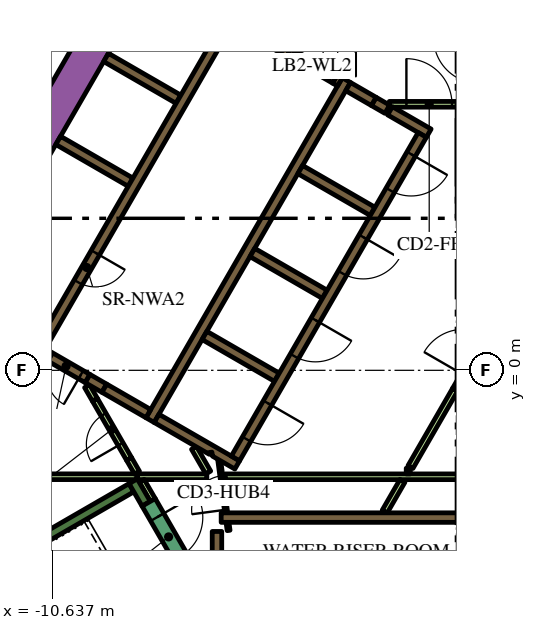
"""IFC4 building model, lengths in metres.
Left out: names, types, materials, properties, quantities, classifications, styles, units other than length and angle.
Written with IfcOpenShell. Run it as: python <this file> out.ifc"""

import sys

from ifc_helpers import new_model, si_unit, direction, frame, frame_2d, origin, place, context, subcontext, project, spatial, polyline, rectangle, outline, extrude, element, fill, save


model = new_model("IFC4")
c1 = context("Model", 3, precision=1e-05, world=origin(), true_north=direction((0.0, 1.0)))
c2 = subcontext(c1, "Body", "Model", "MODEL_VIEW")
j1 = project(units=[si_unit("LENGTHUNIT", "METRE"), si_unit("PLANEANGLEUNIT", "RADIAN")], contexts=[c1])
p1 = place(None, origin())
s1 = spatial("IfcSite", under=j1, at=p1, CompositionType="ELEMENT")
p2 = place(p1, origin())
s2 = spatial("IfcBuilding", under=s1, at=p2, CompositionType="ELEMENT")
p3 = place(p2, frame((0.0, 0.0, 58.8)))
s3 = spatial("IfcBuildingStorey", under=s2, at=p3, CompositionType="ELEMENT", Elevation=58.8)
p4 = place(p3, frame((-14.268, 0.387, 0.0), z_axis=(0.0, 0.0, 1.0), x_axis=(0.499994617707, 0.866028511231, 0.0)))
e1 = element("IfcWall", 1, at=p4, inside=s3, PredefinedType="SOLIDWALL", context=c2, shape_type="SweptSolid", body=[
    extrude(rectangle(XDim=18.817, YDim=0.9, at=frame_2d((9.409, 0.0))), origin(), (0.0, 0.0, 1.0), 3.9),
])
p5 = place(p3, frame((-14.44, -6.49, 0.0), z_axis=(0.0, 0.0, 1.0), x_axis=(0.866022966069, 0.500004222222, 0.0)))
e2 = element("IfcWall", 2, at=p5, inside=s3, PredefinedType="SOLIDWALL", context=c2, shape_type="SweptSolid", body=[
    extrude(rectangle(XDim=6.8, YDim=0.25, at=frame_2d((3.4, 0.0))), origin(), (0.0, 0.0, 1.0), 3.9),
])
p6 = place(p3, frame((-8.163, -3.511, 0.0), z_axis=(0.0, 0.0, 1.0), x_axis=(-0.500206266495, 0.865906283012, 0.0)))
e3 = element("IfcWall", 3, at=p6, inside=s3, PredefinedType="SOLIDWALL", context=c2, shape_type="SweptSolid", body=[
    extrude(rectangle(XDim=0.684, YDim=0.25, at=frame_2d((0.342, 0.0))), origin(), (0.0, 0.0, 1.0), 3.9),
])
p7 = place(p3, frame((-6.3, -4.24, 0.0), z_axis=(0.0, 0.0, 1.0), x_axis=(0.0, -1.0, 0.0)))
e4 = element("IfcWall", 4, at=p7, inside=s3, PredefinedType="SOLIDWALL", context=c2, shape_type="SweptSolid", body=[
    extrude(rectangle(XDim=2.914, YDim=0.25, at=frame_2d((1.457, 0.0))), origin(), (0.0, 0.0, 1.0), 3.9),
])
p8 = place(p3, frame((-6.19, -3.875, 0.0), z_axis=(0.0, 0.0, 1.0), x_axis=(1.0, 0.0, 0.0)))
e5 = element("IfcWall", 5, at=p8, inside=s3, PredefinedType="SOLIDWALL", context=c2, shape_type="SweptSolid", body=[
    extrude(rectangle(XDim=12.615, YDim=0.25, at=frame_2d((6.307, 0.0))), origin(), (0.0, 0.0, 1.0), 3.9),
])
p9 = place(p3, frame((-8.06, -1.311, 0.0), z_axis=(0.0, 0.0, 1.0), x_axis=(0.50000273126, 0.866023826885, 0.0)))
e6 = element("IfcWall", 6, at=p9, inside=s3, PredefinedType="SOLIDWALL", context=c2, shape_type="SweptSolid", body=[
    extrude(rectangle(XDim=10.33, YDim=0.25, at=frame_2d((5.165, 0.0))), origin(), (0.0, 0.0, 1.0), 3.9),
])
p10 = place(p3, frame((-1.819, 6.87, 0.0), z_axis=(0.0, 0.0, 1.0), x_axis=(-0.866294599386, 0.499533449405, 0.0)))
e7 = element("IfcWall", 7, at=p10, inside=s3, PredefinedType="SOLIDWALL", context=c2, shape_type="SweptSolid", body=[
    extrude(rectangle(XDim=0.41, YDim=0.25, at=frame_2d((0.205, 0.0))), origin(), (0.0, 0.0, 1.0), 3.9),
])
p11 = place(p3, frame((-2.849, 7.465, 0.0), z_axis=(0.0, 0.0, 1.0), x_axis=(0.865955664968, -0.500120771724, 0.0)))
e8 = element("IfcWall", 8, at=p11, inside=s3, PredefinedType="SOLIDWALL", context=c2, shape_type="SweptSolid", body=[
    extrude(rectangle(XDim=0.778, YDim=0.25, at=frame_2d((0.389, 0.0))), origin(), (0.0, 0.0, 1.0), 3.9),
])
p12 = place(p3, frame((-0.728, 6.24, 0.0), z_axis=(0.0, 0.0, 1.0), x_axis=(-0.866002680491, 0.500039355833, 0.0)))
e9 = element("IfcWall", 9, at=p12, inside=s3, PredefinedType="SOLIDWALL", context=c2, shape_type="SweptSolid", body=[
    extrude(rectangle(XDim=1.178, YDim=0.25, at=frame_2d((0.589, 0.0))), origin(), (0.0, 0.0, 1.0), 3.9),
])
for number, where, z_axis, x_axis in (
    (10, (-2.204, 4.182, 0.0), (0.0, 0.0, 1.0), (-0.866, 0.5, 0.0)),
    (11, (-5.369, 3.1, 0.0), (0.0, 0.0, 1.0), (0.866, -0.5, 0.0)),
    (12, (-4.724, -0.182, 0.0), (0.0, 0.0, 1.0), (-0.866, 0.5, 0.0)),
):
    element("IfcWall", number, at=place(p3, frame(where, z_axis=z_axis, x_axis=x_axis)), inside=s3, PredefinedType="SOLIDWALL", context=c2, shape_type="SweptSolid", body=[
        extrude(rectangle(XDim=2.2, YDim=0.25, at=frame_2d((1.1, 0.0))), origin(), (0.0, 0.0, 1.0), 3.9),
    ])
p13 = place(p3, origin())
e13 = element("IfcWall", 13, at=p13, inside=s3, PredefinedType="SOLIDWALL", context=c2, shape_type="SweptSolid", body=[
    extrude(outline(polyline([(-5.922, -2.257), (-5.922, -2.257), (-5.705, -2.382), (-5.83, -2.598), (-6.418, -2.258), (-6.433, -2.153), (-6.433, -2.153), (-6.433, -2.153), (-6.508, -2.163), (-6.508, -2.163), (-6.508, -2.163), (-6.501, -2.21), (-7.952, -1.373), (-7.827, -1.156), (-5.922, -2.257)])), origin(), (0.0, 0.0, 1.0), 3.9),
])
p14 = place(p3, frame((-9.708, -0.215, 0.0), z_axis=(0.0, 0.0, 1.0), x_axis=(0.866113839764, -0.499846793097, 0.0)))
e14 = element("IfcWall", 14, at=p14, inside=s3, PredefinedType="SOLIDWALL", context=c2, shape_type="SweptSolid", body=[
    extrude(rectangle(XDim=0.51, YDim=0.25, at=frame_2d((0.255, 0.0))), origin(), (0.0, 0.0, 1.0), 3.9),
])
p15 = place(p3, frame((-9.265, -0.471, 0.0), z_axis=(0.0, 0.0, 1.0), x_axis=(0.865954634268, -0.500122556369, 0.0)))
e15 = element("IfcWall", 15, at=p15, inside=s3, PredefinedType="SOLIDWALL", context=c2, shape_type="SweptSolid", body=[
    extrude(rectangle(XDim=1.338, YDim=0.25, at=frame_2d((0.669, 0.0))), origin(), (0.0, 0.0, 1.0), 3.9),
])
e16 = element("IfcWall", 16, at=p13, inside=s3, PredefinedType="SOLIDWALL", context=c2, shape_type="SweptSolid", body=[
    extrude(outline(polyline([(-3.128, 7.481), (-3.259, 7.557), (-3.134, 7.773), (-3.003, 7.698), (-3.128, 7.481)])), origin(), (0.0, 0.0, 1.0), 3.9),
])
for number, where, z_axis, x_axis in (
    (17, (-8.574, 4.95, 0.0), (0.0, 0.0, 1.0), (-0.866, 0.5, 0.0)),
    (18, (-7.314, 7.132, 0.0), (0.0, 0.0, 1.0), (-0.866, 0.5, 0.0)),
):
    element("IfcWall", number, at=place(p3, frame(where, z_axis=z_axis, x_axis=x_axis)), inside=s3, PredefinedType="SOLIDWALL", context=c2, shape_type="SweptSolid", body=[
        extrude(rectangle(XDim=2.2, YDim=0.25, at=frame_2d((1.1, 0.0))), origin(), (0.0, 0.0, 1.0), 3.9),
    ])
p16 = place(p3, frame((-7.959, 10.415, 0.0), z_axis=(0.0, 0.0, 1.0), x_axis=(0.866020958405, -0.500007699544, 0.0)))
e19 = element("IfcWall", 19, at=p16, inside=s3, PredefinedType="SOLIDWALL", context=c2, shape_type="SweptSolid", body=[
    extrude(rectangle(XDim=4.1, YDim=0.25, at=frame_2d((2.05, 0.0))), origin(), (0.0, 0.0, 1.0), 3.9),
])
p17 = place(p3, frame((-8.395, -2.8, 0.0), z_axis=(0.0, 0.0, 1.0), x_axis=(1.0, 0.0, 0.0)))
e20 = element("IfcWall", 20, at=p17, inside=s3, PredefinedType="PARTITIONING", context=c2, shape_type="SweptSolid", body=[
    extrude(rectangle(XDim=1.828, YDim=0.15, at=frame_2d((0.914, 0.0))), origin(), (0.0, 0.0, 1.0), 2.75),
])
p18 = place(p3, frame((-11.115, -2.8, 0.0), z_axis=(0.0, 0.0, 1.0), x_axis=(1.0, 0.0, 0.0)))
e21 = element("IfcWall", 21, at=p18, inside=s3, PredefinedType="PARTITIONING", context=c2, shape_type="SweptSolid", body=[
    extrude(rectangle(XDim=2.708, YDim=0.15, at=frame_2d((1.354, 0.0))), origin(), (0.0, 0.0, 1.0), 2.75),
])
p19 = place(p3, frame((-6.531, -2.689, 0.0), z_axis=(0.0, 0.0, 1.0), x_axis=(-0.499967446111, 0.866044197965, 0.0)))
e22 = element("IfcWall", 22, at=p19, inside=s3, PredefinedType="PARTITIONING", context=c2, shape_type="SweptSolid", body=[
    extrude(rectangle(XDim=0.748, YDim=0.15, at=frame_2d((0.374, 0.0))), origin(), (0.0, 0.0, 1.0), 2.75),
])
p20 = place(p3, frame((-7.99, -3.412, 0.0), z_axis=(0.0, 0.0, 1.0), x_axis=(-0.500193841991, 0.86591346013, 0.0)))
e23 = element("IfcWall", 23, at=p20, inside=s3, PredefinedType="PARTITIONING", context=c2, shape_type="SweptSolid", body=[
    extrude(rectangle(XDim=0.583, YDim=0.15, at=frame_2d((0.292, 0.0))), origin(), (0.0, 0.0, 1.0), 2.75),
])
p21 = place(p3, frame((-8.612, -2.333, 0.0), z_axis=(0.0, 0.0, 1.0), x_axis=(0.500248216681, -0.86588204838, 0.0)))
e24 = element("IfcWall", 24, at=p21, inside=s3, PredefinedType="PARTITIONING", context=c2, shape_type="SweptSolid", body=[
    extrude(rectangle(XDim=0.415, YDim=0.15, at=frame_2d((0.208, 0.0))), origin(), (0.0, 0.0, 1.0), 2.75),
])
p22 = place(p3, frame((-6.086, -2.801, 0.0), z_axis=(0.0, 0.0, 1.0), x_axis=(1.0, 0.0, 0.0)))
e25 = element("IfcWall", 25, at=p22, inside=s3, PredefinedType="PARTITIONING", context=c2, shape_type="SweptSolid", body=[
    extrude(rectangle(XDim=7.524, YDim=0.15, at=frame_2d((3.762, 0.0))), origin(), (0.0, 0.0, 1.0), 2.75),
])
p23 = place(p3, frame((-1.887, -3.718, 0.0), z_axis=(0.0, 0.0, 1.0), x_axis=(0.499842898591, 0.866116087328, 0.0)))
e26 = element("IfcWall", 26, at=p23, inside=s3, PredefinedType="PARTITIONING", context=c2, shape_type="SweptSolid", body=[
    extrude(rectangle(XDim=0.936, YDim=0.15, at=frame_2d((0.468, 0.0))), origin(), (0.0, 0.0, 1.0), 2.75),
])
p24 = place(p3, frame((-1.212, -2.651, 0.0), z_axis=(0.0, 0.0, 1.0), x_axis=(-1.0, 0.0, 0.0)))
e27 = element("IfcWall", 27, at=p24, inside=s3, PredefinedType="PARTITIONING", context=c2, shape_type="SweptSolid", body=[
    extrude(rectangle(XDim=0.108, YDim=0.15, at=frame_2d((0.054, 0.0))), origin(), (0.0, 0.0, 1.0), 2.75),
])
p25 = place(p3, frame((-1.208, -2.544, 0.0), z_axis=(0.0, 0.0, 1.0), x_axis=(0.499995339376, 0.86602809458, 0.0)))
e28 = element("IfcWall", 28, at=p25, inside=s3, PredefinedType="PARTITIONING", context=c2, shape_type="SweptSolid", body=[
    extrude(rectangle(XDim=2.349, YDim=0.15, at=frame_2d((1.175, 0.0))), origin(), (0.0, 0.0, 1.0), 2.75),
])
p26 = place(p3, frame((-9.512, -0.775, 0.0), z_axis=(0.0, 0.0, 1.0), x_axis=(-0.500080620599, 0.865978852456, 0.0)))
e29 = element("IfcWall", 29, at=p26, inside=s3, PredefinedType="PARTITIONING", context=c2, shape_type="SweptSolid", body=[
    extrude(rectangle(XDim=0.413, YDim=0.15, at=frame_2d((0.207, 0.0))), origin(), (0.0, 0.0, 1.0), 2.75),
])
p27 = place(p3, frame((-6.008, 9.144, 0.0), z_axis=(0.0, 0.0, 1.0), x_axis=(-0.500006956611, -0.866021387346, 0.0)))
e30 = element("IfcWall", 30, at=p27, inside=s3, PredefinedType="SOLIDWALL", context=c2, shape_type="SweptSolid", body=[
    extrude(rectangle(XDim=9.83, YDim=0.25, at=frame_2d((4.915, 0.0))), origin(), (0.0, 0.0, 1.0), 3.9),
])
p28 = place(p27, frame((6.985, 0.0, 0.0)))
e31 = element("IfcOpeningElement", 31, at=p28, cuts=e30, PredefinedType="OPENING", context=c2, shape_type="SweptSolid", body=[
    extrude(rectangle(XDim=0.9, YDim=2.1, at=frame_2d((0.45, 1.05))), frame((0.0, 0.135, 0.0), z_axis=(0.0, -1.0, 0.0), x_axis=(1.0, 0.0, 0.0)), (0.0, 0.0, 1.0), 0.27),
])
p29 = place(p3, frame((-0.898, 6.194, 0.0), z_axis=(0.0, 0.0, 1.0), x_axis=(-0.499996202215, -0.866027596426, 0.0)))
e32 = element("IfcWall", 32, at=p29, inside=s3, PredefinedType="SOLIDWALL", context=c2, shape_type="SweptSolid", body=[
    extrude(rectangle(XDim=9.83, YDim=0.25, at=frame_2d((4.915, 0.0))), origin(), (0.0, 0.0, 1.0), 3.9),
])
p30 = place(p29, frame((0.585, 0.0, 0.0)))
e33 = element("IfcOpeningElement", 33, at=p30, cuts=e32, PredefinedType="OPENING", context=c2, shape_type="SweptSolid", body=[
    extrude(rectangle(XDim=1.1, YDim=2.1, at=frame_2d((0.55, 1.05))), frame((0.0, 0.135, 0.0), z_axis=(0.0, -1.0, 0.0), x_axis=(1.0, 0.0, 0.0)), (0.0, 0.0, 1.0), 0.27),
])
p31 = place(p29, frame((3.105, 0.0, 0.0)))
e34 = element("IfcOpeningElement", 34, at=p31, cuts=e32, PredefinedType="OPENING", context=c2, shape_type="SweptSolid", body=[
    extrude(rectangle(XDim=1.1, YDim=2.1, at=frame_2d((0.55, 1.05))), frame((0.0, 0.135, 0.0), z_axis=(0.0, -1.0, 0.0), x_axis=(1.0, 0.0, 0.0)), (0.0, 0.0, 1.0), 0.27),
])
p32 = place(p29, frame((5.625, 0.0, 0.0)))
e35 = element("IfcOpeningElement", 35, at=p32, cuts=e32, PredefinedType="OPENING", context=c2, shape_type="SweptSolid", body=[
    extrude(rectangle(XDim=1.1, YDim=2.1, at=frame_2d((0.55, 1.05))), frame((0.0, 0.135, 0.0), z_axis=(0.0, -1.0, 0.0), x_axis=(1.0, 0.0, 0.0)), (0.0, 0.0, 1.0), 0.27),
])
p33 = place(p29, frame((8.145, 0.0, 0.0)))
e36 = element("IfcOpeningElement", 36, at=p33, cuts=e32, PredefinedType="OPENING", context=c2, shape_type="SweptSolid", body=[
    extrude(rectangle(XDim=1.1, YDim=2.1, at=frame_2d((0.55, 1.05))), frame((0.0, 0.135, 0.0), z_axis=(0.0, -1.0, 0.0), x_axis=(1.0, 0.0, 0.0)), (0.0, 0.0, 1.0), 0.27),
])
p34 = place(p3, frame((-8.098, -3.474, 0.0), z_axis=(0.0, 0.0, 1.0), x_axis=(0.49994051562, -0.866059744384, 0.0)))
e37 = element("IfcWall", 37, at=p34, inside=s3, PredefinedType="SOLIDWALL", context=c2, shape_type="SweptSolid", body=[
    extrude(rectangle(XDim=2.1, YDim=0.4, at=frame_2d((1.05, 0.0))), origin(), (0.0, 0.0, 1.0), 3.9),
])
p35 = place(p34, frame((0.45, 0.0, 0.0)))
e38 = element("IfcOpeningElement", 38, at=p35, cuts=e37, PredefinedType="OPENING", context=c2, shape_type="SweptSolid", body=[
    extrude(rectangle(XDim=1.2, YDim=2.1, at=frame_2d((0.6, 1.05))), frame((0.0, 0.21, 0.0), z_axis=(0.0, -1.0, 0.0), x_axis=(1.0, 0.0, 0.0)), (0.0, 0.0, 1.0), 0.42),
])
p36 = place(p3, frame((-9.708, -0.215, 0.0), z_axis=(0.0, 0.0, 1.0), x_axis=(-0.866004217611, 0.500036693733, 0.0)))
e39 = element("IfcWall", 39, at=p36, inside=s3, PredefinedType="SOLIDWALL", context=c2, shape_type="SweptSolid", body=[
    extrude(rectangle(XDim=1.3, YDim=0.25, at=frame_2d((0.65, 0.0))), origin(), (0.0, 0.0, 1.0), 3.9),
])
p37 = place(p36, frame((0.2, 0.0, 0.0)))
e40 = element("IfcOpeningElement", 40, at=p37, cuts=e39, PredefinedType="OPENING", context=c2, shape_type="SweptSolid", body=[
    extrude(rectangle(XDim=0.9, YDim=2.1, at=frame_2d((0.45, 1.05))), frame((0.0, 0.135, 0.0), z_axis=(0.0, -1.0, 0.0), x_axis=(1.0, 0.0, 0.0)), (0.0, 0.0, 1.0), 0.27),
])
p38 = place(p3, frame((-1.765, 7.0, 0.0), z_axis=(0.0, 0.0, 1.0), x_axis=(1.0, 0.0, 0.0)))
e41 = element("IfcWall", 41, at=p38, inside=s3, PredefinedType="PARTITIONING", context=c2, shape_type="SweptSolid", body=[
    extrude(rectangle(XDim=2.1, YDim=0.15, at=frame_2d((1.05, 0.0))), origin(), (0.0, 0.0, 1.0), 2.75),
])
p39 = place(p38, frame((0.45, 0.0, 0.0)))
e42 = element("IfcOpeningElement", 42, at=p39, cuts=e41, PredefinedType="OPENING", context=c2, shape_type="SweptSolid", body=[
    extrude(rectangle(XDim=1.2, YDim=2.1, at=frame_2d((0.6, 1.05))), frame((0.0, 0.085, 0.0), z_axis=(0.0, -1.0, 0.0), x_axis=(1.0, 0.0, 0.0)), (0.0, 0.0, 1.0), 0.17),
])
p40 = place(p3, frame((-0.034, -0.509, 0.0), z_axis=(0.0, 0.0, 1.0), x_axis=(0.49994051562, 0.866059744384, 0.0)))
e43 = element("IfcWall", 43, at=p40, inside=s3, PredefinedType="PARTITIONING", context=c2, shape_type="SweptSolid", body=[
    extrude(rectangle(XDim=2.1, YDim=0.15, at=frame_2d((1.05, 0.0))), origin(), (0.0, 0.0, 1.0), 2.75),
])
p41 = place(p40, frame((0.45, 0.0, 0.0)))
e44 = element("IfcOpeningElement", 44, at=p41, cuts=e43, PredefinedType="OPENING", context=c2, shape_type="SweptSolid", body=[
    extrude(rectangle(XDim=1.2, YDim=2.1, at=frame_2d((0.6, 1.05))), frame((0.0, 0.085, 0.0), z_axis=(0.0, -1.0, 0.0), x_axis=(1.0, 0.0, 0.0)), (0.0, 0.0, 1.0), 0.17),
])
p42 = place(p3, frame((-5.995, -4.213, 0.0), z_axis=(0.0, 0.0, 1.0), x_axis=(-0.132072335448, 0.991240081014, 0.0)))
e45 = element("IfcWall", 45, at=p42, inside=s3, PredefinedType="PARTITIONING", context=c2, shape_type="SweptSolid", body=[
    extrude(rectangle(XDim=2.1, YDim=0.076, at=frame_2d((1.05, 0.0))), origin(), (0.0, 0.0, 1.0), 2.75),
])
p43 = place(p42, frame((0.55, 0.0, 0.0)))
e46 = element("IfcOpeningElement", 46, at=p43, cuts=e45, PredefinedType="OPENING", context=c2, shape_type="SweptSolid", body=[
    extrude(rectangle(XDim=0.9, YDim=2.1, at=frame_2d((0.45, 1.05))), frame((0.0, 0.048, 0.0), z_axis=(0.0, -1.0, 0.0), x_axis=(1.0, 0.0, 0.0)), (0.0, 0.0, 1.0), 0.096),
])
p44 = place(p3, frame((-4.409, 8.365, 0.0), z_axis=(0.0, 0.0, 1.0), x_axis=(0.866034573852, -0.49998411664, 0.0)))
e47 = element("IfcWall", 47, at=p44, inside=s3, PredefinedType="SOLIDWALL", context=c2, shape_type="SweptSolid", body=[
    extrude(rectangle(XDim=1.4, YDim=0.25, at=frame_2d((0.7, 0.0))), origin(), (0.0, 0.0, 1.0), 3.9),
])
p45 = place(p44, frame((0.1, 0.0, 0.0)))
e48 = element("IfcOpeningElement", 48, at=p45, cuts=e47, PredefinedType="OPENING", context=c2, shape_type="SweptSolid", body=[
    extrude(rectangle(XDim=1.2, YDim=2.1, at=frame_2d((0.6, 1.05))), frame((0.0, 0.135, 0.0), z_axis=(0.0, -1.0, 0.0), x_axis=(1.0, 0.0, 0.0)), (0.0, 0.0, 1.0), 0.27),
])
p46 = place(p3, frame((-8.612, -2.333, 0.0), z_axis=(0.0, 0.0, 1.0), x_axis=(-0.499961193289, 0.866047807691, 0.0)))
e49 = element("IfcWall", 49, at=p46, inside=s3, PredefinedType="PARTITIONING", context=c2, shape_type="SweptSolid", body=[
    extrude(rectangle(XDim=1.8, YDim=0.15, at=frame_2d((0.9, 0.0))), origin(), (0.0, 0.0, 1.0), 2.75),
])
p47 = place(p46, frame((0.45, 0.0, 0.0)))
e50 = element("IfcOpeningElement", 50, at=p47, cuts=e49, PredefinedType="OPENING", context=c2, shape_type="SweptSolid", body=[
    extrude(rectangle(XDim=0.9, YDim=2.1, at=frame_2d((0.45, 1.05))), frame((0.0, 0.085, 0.0), z_axis=(0.0, -1.0, 0.0), x_axis=(1.0, 0.0, 0.0)), (0.0, 0.0, 1.0), 0.17),
])
p48 = place(p3, frame((-19.081, -3.9, 0.0), z_axis=(0.0, 0.0, 1.0), x_axis=(0.499998313975, 0.866026377209, 0.0)))
e51 = element("IfcWall", 51, at=p48, inside=s3, PredefinedType="PARTITIONING", context=c2, shape_type="SweptSolid", body=[
    extrude(rectangle(XDim=25.766, YDim=0.15, at=frame_2d((12.883, 0.0))), origin(), (0.0, 0.0, 1.0), 2.75),
])
p49 = place(p48, frame((22.445, 0.0, 0.0)))
e52 = element("IfcOpeningElement", 52, at=p49, cuts=e51, PredefinedType="OPENING", context=c2, shape_type="SweptSolid", body=[
    extrude(rectangle(XDim=1.0, YDim=2.1, at=frame_2d((0.5, 1.05))), frame((0.0, 0.085, 0.0), z_axis=(0.0, -1.0, 0.0), x_axis=(1.0, 0.0, 0.0)), (0.0, 0.0, 1.0), 0.17),
])
p50 = place(p48, frame((21.138, 0.0, 0.0)))
e53 = element("IfcOpeningElement", 53, at=p50, cuts=e51, PredefinedType="OPENING", context=c2, shape_type="SweptSolid", body=[
    extrude(rectangle(XDim=1.0, YDim=2.1, at=frame_2d((0.5, 1.05))), frame((0.0, 0.085, 0.0), z_axis=(0.0, -1.0, 0.0), x_axis=(1.0, 0.0, 0.0)), (0.0, 0.0, 1.0), 0.17),
])
p51 = place(p48, frame((14.066, 0.0, 0.0)))
e54 = element("IfcOpeningElement", 54, at=p51, cuts=e51, PredefinedType="OPENING", context=c2, shape_type="SweptSolid", body=[
    extrude(rectangle(XDim=0.9, YDim=2.1, at=frame_2d((0.45, 1.05))), frame((0.0, 0.085, 0.0), z_axis=(0.0, -1.0, 0.0), x_axis=(1.0, 0.0, 0.0)), (0.0, 0.0, 1.0), 0.17),
])
p52 = place(p48, frame((11.693, 0.0, 0.0)))
e55 = element("IfcOpeningElement", 55, at=p52, cuts=e51, PredefinedType="OPENING", context=c2, shape_type="SweptSolid", body=[
    extrude(rectangle(XDim=1.0, YDim=2.1, at=frame_2d((0.5, 1.05))), frame((0.0, 0.085, 0.0), z_axis=(0.0, -1.0, 0.0), x_axis=(1.0, 0.0, 0.0)), (0.0, 0.0, 1.0), 0.17),
])
p53 = place(p28, origin())
e56 = element("IfcDoor", 56, at=p53, inside=s3, OperationType="SINGLE_SWING_LEFT", PredefinedType="DOOR", context=c2, shape_type="SweptSolid", body=[
    extrude(rectangle(XDim=0.9, YDim=2.1, at=frame_2d((0.45, 1.05))), frame((0.0, 0.025, 0.0), z_axis=(0.0, -1.0, 0.0), x_axis=(1.0, 0.0, 0.0)), (0.0, 0.0, 1.0), 0.05),
])
fill(e31, e56)
p54 = place(p30, origin())
e57 = element("IfcDoor", 57, at=p54, inside=s3, OperationType="DOUBLE_DOOR_SLIDING", PredefinedType="DOOR", context=c2, shape_type="SweptSolid", body=[
    extrude(rectangle(XDim=1.1, YDim=2.1, at=frame_2d((0.55, 1.05))), frame((0.0, 0.025, 0.0), z_axis=(0.0, -1.0, 0.0), x_axis=(1.0, 0.0, 0.0)), (0.0, 0.0, 1.0), 0.05),
])
fill(e33, e57)
p55 = place(p31, origin())
e58 = element("IfcDoor", 58, at=p55, inside=s3, OperationType="DOUBLE_DOOR_SLIDING", PredefinedType="DOOR", context=c2, shape_type="SweptSolid", body=[
    extrude(rectangle(XDim=1.1, YDim=2.1, at=frame_2d((0.55, 1.05))), frame((0.0, 0.025, 0.0), z_axis=(0.0, -1.0, 0.0), x_axis=(1.0, 0.0, 0.0)), (0.0, 0.0, 1.0), 0.05),
])
fill(e34, e58)
p56 = place(p32, origin())
e59 = element("IfcDoor", 59, at=p56, inside=s3, OperationType="DOUBLE_DOOR_SLIDING", PredefinedType="DOOR", context=c2, shape_type="SweptSolid", body=[
    extrude(rectangle(XDim=1.1, YDim=2.1, at=frame_2d((0.55, 1.05))), frame((0.0, 0.025, 0.0), z_axis=(0.0, -1.0, 0.0), x_axis=(1.0, 0.0, 0.0)), (0.0, 0.0, 1.0), 0.05),
])
fill(e35, e59)
p57 = place(p33, origin())
e60 = element("IfcDoor", 60, at=p57, inside=s3, OperationType="DOUBLE_DOOR_SLIDING", PredefinedType="DOOR", context=c2, shape_type="SweptSolid", body=[
    extrude(rectangle(XDim=1.1, YDim=2.1, at=frame_2d((0.55, 1.05))), frame((0.0, 0.025, 0.0), z_axis=(0.0, -1.0, 0.0), x_axis=(1.0, 0.0, 0.0)), (0.0, 0.0, 1.0), 0.05),
])
fill(e36, e60)
p58 = place(p35, origin())
e61 = element("IfcDoor", 61, at=p58, inside=s3, OperationType="SINGLE_SWING_LEFT", PredefinedType="DOOR", context=c2, shape_type="SweptSolid", body=[
    extrude(rectangle(XDim=1.2, YDim=2.1, at=frame_2d((0.6, 1.05))), frame((0.0, 0.025, 0.0), z_axis=(0.0, -1.0, 0.0), x_axis=(1.0, 0.0, 0.0)), (0.0, 0.0, 1.0), 0.05),
])
fill(e38, e61)
p59 = place(p37, origin())
e62 = element("IfcDoor", 62, at=p59, inside=s3, OperationType="SINGLE_SWING_LEFT", PredefinedType="DOOR", context=c2, shape_type="SweptSolid", body=[
    extrude(rectangle(XDim=0.9, YDim=2.1, at=frame_2d((0.45, 1.05))), frame((0.0, 0.025, 0.0), z_axis=(0.0, -1.0, 0.0), x_axis=(1.0, 0.0, 0.0)), (0.0, 0.0, 1.0), 0.05),
])
fill(e40, e62)
p60 = place(p39, origin())
e63 = element("IfcDoor", 63, at=p60, inside=s3, OperationType="SINGLE_SWING_LEFT", PredefinedType="DOOR", context=c2, shape_type="SweptSolid", body=[
    extrude(rectangle(XDim=1.2, YDim=2.1, at=frame_2d((0.6, 1.05))), frame((0.0, 0.025, 0.0), z_axis=(0.0, -1.0, 0.0), x_axis=(1.0, 0.0, 0.0)), (0.0, 0.0, 1.0), 0.05),
])
fill(e42, e63)
p61 = place(p43, origin())
e64 = element("IfcDoor", 64, at=p61, inside=s3, OperationType="SINGLE_SWING_LEFT", PredefinedType="DOOR", context=c2, shape_type="SweptSolid", body=[
    extrude(rectangle(XDim=0.9, YDim=2.1, at=frame_2d((0.45, 1.05))), frame((0.0, 0.025, 0.0), z_axis=(0.0, -1.0, 0.0), x_axis=(1.0, 0.0, 0.0)), (0.0, 0.0, 1.0), 0.05),
])
fill(e46, e64)
p62 = place(p45, origin())
e65 = element("IfcDoor", 65, at=p62, inside=s3, OperationType="SINGLE_SWING_LEFT", PredefinedType="DOOR", context=c2, shape_type="SweptSolid", body=[
    extrude(rectangle(XDim=1.2, YDim=2.1, at=frame_2d((0.6, 1.05))), frame((0.0, 0.025, 0.0), z_axis=(0.0, -1.0, 0.0), x_axis=(1.0, 0.0, 0.0)), (0.0, 0.0, 1.0), 0.05),
])
fill(e48, e65)
p63 = place(p47, origin())
e66 = element("IfcDoor", 66, at=p63, inside=s3, OperationType="SINGLE_SWING_LEFT", PredefinedType="DOOR", context=c2, shape_type="SweptSolid", body=[
    extrude(rectangle(XDim=0.9, YDim=2.1, at=frame_2d((0.45, 1.05))), frame((0.0, 0.025, 0.0), z_axis=(0.0, -1.0, 0.0), x_axis=(1.0, 0.0, 0.0)), (0.0, 0.0, 1.0), 0.05),
])
fill(e50, e66)
save(model, sys.argv[1])
